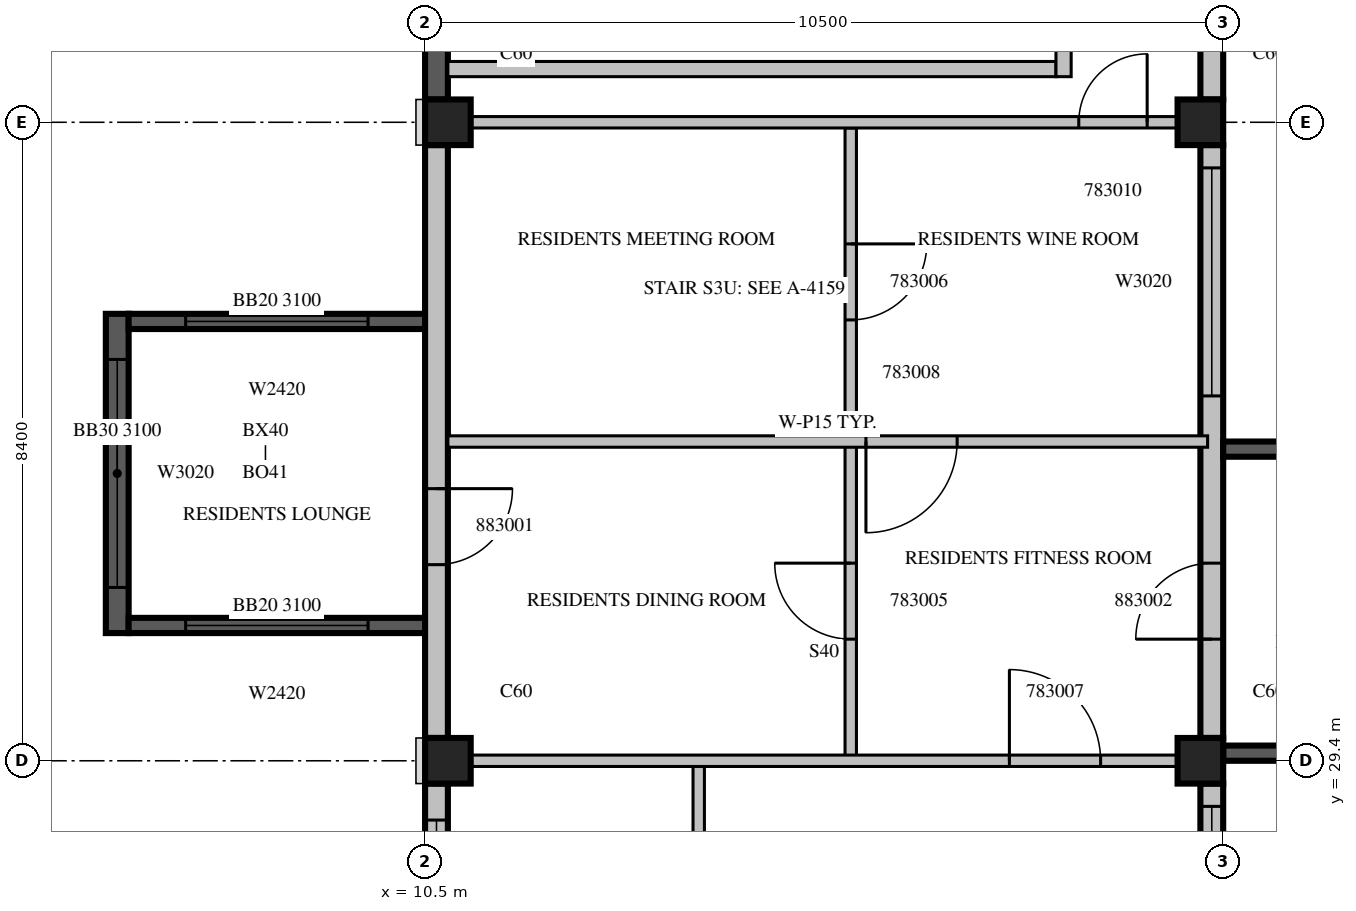
"""IFC4 building model, lengths in metres.
Left out: names, types, materials, properties, quantities, classifications, styles, units other than length and angle.
Written with IfcOpenShell. Run it as: python <this file> out.ifc"""

import sys

from ifc_helpers import new_model, si_unit, direction, frame, frame_2d, origin, origin_2d, place, context, subcontext, project, spatial, rectangle, extrude, source, transform, mapped, element, fill, save


model = new_model("IFC4")
c1 = context("Model", 3, precision=1e-05, world=origin(), true_north=direction((0.0, 1.0)))
c2 = subcontext(c1, "Body", "Model", "MODEL_VIEW")
j1 = project(units=[si_unit("LENGTHUNIT", "METRE"), si_unit("PLANEANGLEUNIT", "RADIAN")], contexts=[c1])
p1 = place(None, origin())
s1 = spatial("IfcSite", under=j1, at=p1, CompositionType="ELEMENT")
p2 = place(p1, origin())
s2 = spatial("IfcBuilding", under=s1, at=p2, CompositionType="ELEMENT")
p3 = place(p2, frame((0.0, 0.0, 351.0)))
s3 = spatial("IfcBuildingStorey", under=s2, at=p3, CompositionType="ELEMENT", Elevation=351.0)
m1 = source(origin(), c2, "Body", "SweptSolid", [
    extrude(rectangle(XDim=0.6, YDim=0.6, at=origin_2d()), origin(), (0.0, 0.0, 1.0), 3.5),
])
for number, where, z_axis, x_axis in (
    (1, (10.8, 29.4, 0.0), (0.0, 0.0, 1.0), (1.0, 0.0, 0.0)),
    (2, (20.7, 29.4, 0.0), (0.0, 0.0, 1.0), (1.0, 0.0, 0.0)),
    (3, (10.8, 37.8, 0.0), (0.0, 0.0, 1.0), (1.0, 0.0, 0.0)),
    (4, (20.7, 37.8, 0.0), (0.0, 0.0, 1.0), (1.0, 0.0, 0.0)),
):
    element("IfcColumn", number, at=place(p3, frame(where, z_axis=z_axis, x_axis=x_axis)), inside=s3, PredefinedType="COLUMN", context=c2, shape_type="MappedRepresentation", body=[
        mapped(m1, transform((0.0, 0.0, 0.0), scale=1.0)),
    ])
m2 = source(origin(), c2, "Body", "SweptSolid", [
    extrude(rectangle(XDim=4.2, YDim=0.3, at=frame_2d((2.1, 0.0))), origin(), (0.0, 0.0, 1.0), 3.1),
])
p4 = place(p3, frame((6.45, 35.28, 0.0), z_axis=(0.0, 0.0, 1.0), x_axis=(0.0, -1.0, 0.0)))
e5 = element("IfcWall", 5, at=p4, inside=s3, PredefinedType="SOLIDWALL", context=c2, shape_type="MappedRepresentation", body=[
    mapped(m2, transform((0.0, 0.0, 0.0), scale=1.0)),
])
m3 = source(origin(), c2, "Body", "SweptSolid", [
    extrude(rectangle(XDim=3.0, YDim=2.0, at=frame_2d((1.5, 1.0))), frame((0.0, 0.16, 0.0), z_axis=(0.0, -1.0, 0.0), x_axis=(1.0, 0.0, 0.0)), (0.0, 0.0, 1.0), 0.32),
])
p5 = place(p4, frame((0.6, 0.0, 0.6)))
e6 = element("IfcOpeningElement", 6, at=p5, cuts=e5, PredefinedType="OPENING", context=c2, shape_type="MappedRepresentation", body=[
    mapped(m3, transform((0.0, 0.0, 0.0), scale=1.0)),
])
m4 = source(origin(), c2, "Body", "SweptSolid", [
    extrude(rectangle(XDim=3.9, YDim=0.2, at=frame_2d((1.95, 0.0))), origin(), (0.0, 0.0, 1.0), 3.1),
])
p6 = place(p3, frame((10.5, 35.18, 0.0), z_axis=(0.0, 0.0, 1.0), x_axis=(-1.0, 0.0, 0.0)))
e7 = element("IfcWall", 7, at=p6, inside=s3, PredefinedType="SOLIDWALL", context=c2, shape_type="MappedRepresentation", body=[
    mapped(m4, transform((0.0, 0.0, 0.0), scale=1.0)),
])
m5 = source(origin(), c2, "Body", "SweptSolid", [
    extrude(rectangle(XDim=2.4, YDim=2.0, at=frame_2d((1.2, 1.0))), frame((0.0, 0.11, 0.0), z_axis=(0.0, -1.0, 0.0), x_axis=(1.0, 0.0, 0.0)), (0.0, 0.0, 1.0), 0.22),
])
p7 = place(p6, frame((0.75, 0.0, 0.6)))
e8 = element("IfcOpeningElement", 8, at=p7, cuts=e7, PredefinedType="OPENING", context=c2, shape_type="MappedRepresentation", body=[
    mapped(m5, transform((0.0, 0.0, 0.0), scale=1.0)),
])
p8 = place(p3, frame((10.5, 31.18, 0.0), z_axis=(0.0, 0.0, 1.0), x_axis=(-1.0, 0.0, 0.0)))
e9 = element("IfcWall", 9, at=p8, inside=s3, PredefinedType="SOLIDWALL", context=c2, shape_type="MappedRepresentation", body=[
    mapped(m4, transform((0.0, 0.0, 0.0), scale=1.0)),
])
p9 = place(p8, frame((0.75, 0.0, 0.6)))
e10 = element("IfcOpeningElement", 10, at=p9, cuts=e9, PredefinedType="OPENING", context=c2, shape_type="MappedRepresentation", body=[
    mapped(m5, transform((0.0, 0.0, 0.0), scale=1.0)),
])
m6 = source(origin(), c2, "Body", "SweptSolid", [
    extrude(rectangle(XDim=7.5, YDim=0.3, at=frame_2d((3.75, 0.0))), origin(), (0.0, 0.0, 1.0), 3.1),
])
p10 = place(p3, frame((20.85, 21.6, 0.0), z_axis=(0.0, 0.0, 1.0), x_axis=(0.0, 1.0, 0.0)))
e11 = element("IfcWall", 11, at=p10, inside=s3, PredefinedType="STANDARD", context=c2, shape_type="MappedRepresentation", body=[
    mapped(m6, transform((0.0, 0.0, 0.0), scale=1.0)),
])
m7 = source(origin(), c2, "Body", "SweptSolid", [
    extrude(rectangle(XDim=2.4, YDim=2.0, at=frame_2d((1.2, 1.0))), frame((0.0, 0.16, 0.0), z_axis=(0.0, -1.0, 0.0), x_axis=(1.0, 0.0, 0.0)), (0.0, 0.0, 1.0), 0.32),
])
p11 = place(p10, frame((0.3, 0.0, 0.6)))
e12 = element("IfcOpeningElement", 12, at=p11, cuts=e11, PredefinedType="OPENING", context=c2, shape_type="MappedRepresentation", body=[
    mapped(m7, transform((0.0, 0.0, 0.0), scale=1.0)),
])
p12 = place(p10, frame((4.2, 0.0, 0.6)))
e13 = element("IfcOpeningElement", 13, at=p12, cuts=e11, PredefinedType="OPENING", context=c2, shape_type="MappedRepresentation", body=[
    mapped(m3, transform((0.0, 0.0, 0.0), scale=1.0)),
])
m8 = source(origin(), c2, "Body", "SweptSolid", [
    extrude(rectangle(XDim=7.8, YDim=0.3, at=frame_2d((3.9, 0.0))), origin(), (0.0, 0.0, 1.0), 3.1),
])
p13 = place(p3, frame((20.85, 29.7, 0.0), z_axis=(0.0, 0.0, 1.0), x_axis=(0.0, 1.0, 0.0)))
e14 = element("IfcWall", 14, at=p13, inside=s3, PredefinedType="STANDARD", context=c2, shape_type="MappedRepresentation", body=[
    mapped(m8, transform((0.0, 0.0, 0.0), scale=1.0)),
])
p14 = place(p13, frame((4.5, 0.0, 0.6)))
e15 = element("IfcOpeningElement", 15, at=p14, cuts=e14, PredefinedType="OPENING", context=c2, shape_type="MappedRepresentation", body=[
    mapped(m3, transform((0.0, 0.0, 0.0), scale=1.0)),
])
m9 = source(origin(), c2, "Body", "SweptSolid", [
    extrude(rectangle(XDim=1.0, YDim=2.1, at=frame_2d((0.5, 1.05))), frame((0.0, 0.16, 0.0), z_axis=(0.0, -1.0, 0.0), x_axis=(1.0, 0.0, 0.0)), (0.0, 0.0, 1.0), 0.32),
])
p15 = place(p13, frame((1.3, 0.0, 0.0)))
e16 = element("IfcOpeningElement", 16, at=p15, cuts=e14, PredefinedType="OPENING", context=c2, shape_type="MappedRepresentation", body=[
    mapped(m9, transform((0.0, 0.0, 0.0), scale=1.0)),
])
m10 = source(origin(), c2, "Body", "SweptSolid", [
    extrude(rectangle(XDim=5.58, YDim=0.3, at=frame_2d((2.79, 0.0))), origin(), (0.0, 0.0, 1.0), 3.1),
])
p16 = place(p3, frame((20.85, 38.1, 0.0), z_axis=(0.0, 0.0, 1.0), x_axis=(0.0, 1.0, 0.0)))
e17 = element("IfcWall", 17, at=p16, inside=s3, PredefinedType="STANDARD", context=c2, shape_type="MappedRepresentation", body=[
    mapped(m10, transform((0.0, 0.0, 0.0), scale=1.0)),
])
m11 = source(origin(), c2, "Body", "SweptSolid", [
    extrude(rectangle(XDim=3.6, YDim=2.0, at=frame_2d((1.8, 1.0))), frame((0.0, 0.16, 0.0), z_axis=(0.0, -1.0, 0.0), x_axis=(1.0, 0.0, 0.0)), (0.0, 0.0, 1.0), 0.32),
])
p17 = place(p16, frame((0.84, 0.0, 0.6)))
e18 = element("IfcOpeningElement", 18, at=p17, cuts=e17, PredefinedType="OPENING", context=c2, shape_type="MappedRepresentation", body=[
    mapped(m11, transform((0.0, 0.0, 0.0), scale=1.0)),
])
m12 = source(origin(), c2, "Body", "SweptSolid", [
    extrude(rectangle(XDim=5.58, YDim=0.3, at=frame_2d((2.79, 0.0))), origin(), (0.0, 0.0, 1.0), 3.1),
])
p18 = place(p3, frame((10.65, 43.68, 0.0), z_axis=(0.0, 0.0, 1.0), x_axis=(0.0, -1.0, 0.0)))
e19 = element("IfcWall", 19, at=p18, inside=s3, PredefinedType="SOLIDWALL", context=c2, shape_type="MappedRepresentation", body=[
    mapped(m12, transform((0.0, 0.0, 0.0), scale=1.0)),
])
p19 = place(p3, frame((10.65, 37.5, 0.0), z_axis=(0.0, 0.0, 1.0), x_axis=(0.0, -1.0, 0.0)))
e20 = element("IfcWall", 20, at=p19, inside=s3, PredefinedType="STANDARD", context=c2, shape_type="MappedRepresentation", body=[
    mapped(m8, transform((0.0, 0.0, 0.0), scale=1.0)),
])
p20 = place(p19, frame((4.52, 0.0, 0.0)))
e21 = element("IfcOpeningElement", 21, at=p20, cuts=e20, PredefinedType="OPENING", context=c2, shape_type="MappedRepresentation", body=[
    mapped(m9, transform((0.0, 0.0, 0.0), scale=1.0)),
])
p21 = place(p3, frame((10.65, 29.1, 0.0), z_axis=(0.0, 0.0, 1.0), x_axis=(0.0, -1.0, 0.0)))
e22 = element("IfcWall", 22, at=p21, inside=s3, PredefinedType="STANDARD", context=c2, shape_type="MappedRepresentation", body=[
    mapped(m6, transform((0.0, 0.0, 0.0), scale=1.0)),
])
p22 = place(p21, frame((3.36, 0.0, 0.6)))
e23 = element("IfcOpeningElement", 23, at=p22, cuts=e22, PredefinedType="OPENING", context=c2, shape_type="MappedRepresentation", body=[
    mapped(m11, transform((0.0, 0.0, 0.0), scale=1.0)),
])
p23 = place(p21, frame((0.48, 0.0, 0.6)))
e24 = element("IfcOpeningElement", 24, at=p23, cuts=e22, PredefinedType="OPENING", context=c2, shape_type="MappedRepresentation", body=[
    mapped(m7, transform((0.0, 0.0, 0.0), scale=1.0)),
])
m13 = source(origin(), c2, "Body", "SweptSolid", [
    extrude(rectangle(XDim=3.9, YDim=0.2, at=frame_2d((1.95, 0.0))), origin(), (0.0, 0.0, 1.0), 3.09),
])
p24 = place(p3, frame((21.0, 29.5, 0.0), z_axis=(0.0, 0.0, 1.0), x_axis=(1.0, 0.0, 0.0)))
e25 = element("IfcWall", 25, at=p24, inside=s3, PredefinedType="SOLIDWALL", context=c2, shape_type="MappedRepresentation", body=[
    mapped(m13, transform((0.0, 0.0, 0.0), scale=1.0)),
])
p25 = place(p24, frame((0.75, 0.0, 0.6)))
e26 = element("IfcOpeningElement", 26, at=p25, cuts=e25, PredefinedType="OPENING", context=c2, shape_type="MappedRepresentation", body=[
    mapped(m5, transform((0.0, 0.0, 0.0), scale=1.0)),
])
p26 = place(p3, frame((21.0, 33.5, 0.0), z_axis=(0.0, 0.0, 1.0), x_axis=(1.0, 0.0, 0.0)))
e27 = element("IfcWall", 27, at=p26, inside=s3, PredefinedType="SOLIDWALL", context=c2, shape_type="MappedRepresentation", body=[
    mapped(m13, transform((0.0, 0.0, 0.0), scale=1.0)),
])
p27 = place(p26, frame((0.75, 0.0, 0.6)))
e28 = element("IfcOpeningElement", 28, at=p27, cuts=e27, PredefinedType="OPENING", context=c2, shape_type="MappedRepresentation", body=[
    mapped(m5, transform((0.0, 0.0, 0.0), scale=1.0)),
])
m14 = source(origin(), c2, "Body", "SweptSolid", [
    extrude(rectangle(XDim=8.0, YDim=0.2, at=frame_2d((4.0, 0.0))), origin(), (0.0, 0.0, 1.0), 3.1),
])
p28 = place(p3, frame((10.8, 38.5, 0.0), z_axis=(0.0, 0.0, 1.0), x_axis=(1.0, 0.0, 0.0)))
e29 = element("IfcWall", 29, at=p28, inside=s3, PredefinedType="PARTITIONING", context=c2, shape_type="MappedRepresentation", body=[
    mapped(m14, transform((0.0, 0.0, 0.0), scale=1.0)),
])
m15 = source(origin(), c2, "Body", "SweptSolid", [
    extrude(rectangle(XDim=5.45, YDim=0.2, at=frame_2d((2.725, 0.0))), origin(), (0.0, 0.0, 1.0), 3.1),
])
p29 = place(p3, frame((18.9, 38.4, 0.0), z_axis=(0.0, 0.0, 1.0), x_axis=(0.0, 1.0, 0.0)))
e30 = element("IfcWall", 30, at=p29, inside=s3, PredefinedType="PARTITIONING", context=c2, shape_type="MappedRepresentation", body=[
    mapped(m15, transform((0.0, 0.0, 0.0), scale=1.0)),
])
m16 = source(origin(), c2, "Body", "SweptSolid", [
    extrude(rectangle(XDim=1.2, YDim=2.1, at=frame_2d((0.6, 1.05))), frame((0.0, 0.11, 0.0), z_axis=(0.0, -1.0, 0.0), x_axis=(1.0, 0.0, 0.0)), (0.0, 0.0, 1.0), 0.22),
])
p30 = place(p29, frame((0.4, 0.0, 0.0)))
e31 = element("IfcOpeningElement", 31, at=p30, cuts=e30, PredefinedType="OPENING", context=c2, shape_type="MappedRepresentation", body=[
    mapped(m16, transform((0.0, 0.0, 0.0), scale=1.0)),
])
m17 = source(origin(), c2, "Body", "SweptSolid", [
    extrude(rectangle(XDim=0.9, YDim=2.1, at=frame_2d((0.45, 1.05))), frame((0.0, 0.11, 0.0), z_axis=(0.0, -1.0, 0.0), x_axis=(1.0, 0.0, 0.0)), (0.0, 0.0, 1.0), 0.22),
])
p31 = place(p29, frame((3.25, 0.0, 0.0)))
e32 = element("IfcOpeningElement", 32, at=p31, cuts=e30, PredefinedType="OPENING", context=c2, shape_type="MappedRepresentation", body=[
    mapped(m17, transform((0.0, 0.0, 0.0), scale=1.0)),
])
m18 = source(origin(), c2, "Body", "SweptSolid", [
    extrude(rectangle(XDim=7.725, YDim=0.15, at=frame_2d((3.862, 0.0))), origin(), (0.0, 0.0, 1.0), 3.1),
])
p32 = place(p3, frame((14.1, 29.325, 0.0), z_axis=(0.0, 0.0, 1.0), x_axis=(0.0, -1.0, 0.0)))
e33 = element("IfcWall", 33, at=p32, inside=s3, PredefinedType="PARTITIONING", context=c2, shape_type="MappedRepresentation", body=[
    mapped(m18, transform((0.0, 0.0, 0.0), scale=1.0)),
])
m19 = source(origin(), c2, "Body", "SweptSolid", [
    extrude(rectangle(XDim=2.2, YDim=2.1, at=frame_2d((1.1, 1.05))), frame((0.0, 0.085, 0.0), z_axis=(0.0, -1.0, 0.0), x_axis=(1.0, 0.0, 0.0)), (0.0, 0.0, 1.0), 0.17),
])
p33 = place(p32, frame((4.925, 0.0, 0.0)))
e34 = element("IfcOpeningElement", 34, at=p33, cuts=e33, PredefinedType="OPENING", context=c2, shape_type="MappedRepresentation", body=[
    mapped(m19, transform((0.0, 0.0, 0.0), scale=1.0)),
])
m20 = source(origin(), c2, "Body", "SweptSolid", [
    extrude(rectangle(XDim=4.2, YDim=0.15, at=frame_2d((2.1, 0.0))), origin(), (0.0, 0.0, 1.0), 3.1),
])
p34 = place(p3, frame((16.1, 33.6, 0.0), z_axis=(0.0, 0.0, 1.0), x_axis=(0.0, -1.0, 0.0)))
e35 = element("IfcWall", 35, at=p34, inside=s3, PredefinedType="PARTITIONING", context=c2, shape_type="MappedRepresentation", body=[
    mapped(m20, transform((0.0, 0.0, 0.0), scale=1.0)),
])
m21 = source(origin(), c2, "Body", "SweptSolid", [
    extrude(rectangle(XDim=1.0, YDim=2.1, at=frame_2d((0.5, 1.05))), frame((0.0, 0.085, 0.0), z_axis=(0.0, -1.0, 0.0), x_axis=(1.0, 0.0, 0.0)), (0.0, 0.0, 1.0), 0.17),
])
p35 = place(p34, frame((1.6, 0.0, 0.0)))
e36 = element("IfcOpeningElement", 36, at=p35, cuts=e35, PredefinedType="OPENING", context=c2, shape_type="MappedRepresentation", body=[
    mapped(m21, transform((0.0, 0.0, 0.0), scale=1.0)),
])
m22 = source(origin(), c2, "Body", "SweptSolid", [
    extrude(rectangle(XDim=4.105, YDim=0.15, at=frame_2d((2.053, 0.0))), origin(), (0.0, 0.0, 1.0), 3.1),
])
p36 = place(p3, frame((16.1, 37.725, 0.0), z_axis=(0.0, 0.0, 1.0), x_axis=(0.0, -1.0, 0.0)))
e37 = element("IfcWall", 37, at=p36, inside=s3, PredefinedType="PARTITIONING", context=c2, shape_type="MappedRepresentation", body=[
    mapped(m22, transform((0.0, 0.0, 0.0), scale=1.0)),
])
p37 = place(p36, frame((1.525, 0.0, 0.0)))
e38 = element("IfcOpeningElement", 38, at=p37, cuts=e37, PredefinedType="OPENING", context=c2, shape_type="MappedRepresentation", body=[
    mapped(m21, transform((0.0, 0.0, 0.0), scale=1.0)),
])
m23 = source(origin(), c2, "Body", "SweptSolid", [
    extrude(rectangle(XDim=9.302, YDim=0.15, at=frame_2d((4.651, 0.0))), origin(), (0.0, 0.0, 1.0), 3.1),
])
p38 = place(p3, frame((11.099, 29.4, 0.0), z_axis=(0.0, 0.0, 1.0), x_axis=(1.0, 0.0, 0.0)))
e39 = element("IfcWall", 39, at=p38, inside=s3, PredefinedType="PARTITIONING", context=c2, shape_type="MappedRepresentation", body=[
    mapped(m23, transform((0.0, 0.0, 0.0), scale=1.0)),
])
m24 = source(origin(), c2, "Body", "SweptSolid", [
    extrude(rectangle(XDim=1.2, YDim=2.1, at=frame_2d((0.6, 1.05))), frame((0.0, 0.085, 0.0), z_axis=(0.0, -1.0, 0.0), x_axis=(1.0, 0.0, 0.0)), (0.0, 0.0, 1.0), 0.17),
])
p39 = place(p38, frame((7.088, 0.0, 0.0)))
e40 = element("IfcOpeningElement", 40, at=p39, cuts=e39, PredefinedType="OPENING", context=c2, shape_type="MappedRepresentation", body=[
    mapped(m24, transform((0.0, 0.0, 0.0), scale=1.0)),
])
m25 = source(origin(), c2, "Body", "SweptSolid", [
    extrude(rectangle(XDim=9.995, YDim=0.15, at=frame_2d((4.997, 0.0))), origin(), (0.0, 0.0, 1.0), 3.1),
])
p40 = place(p3, frame((10.8, 33.6, 0.0), z_axis=(0.0, 0.0, 1.0), x_axis=(1.0, 0.0, 0.0)))
e41 = element("IfcWall", 41, at=p40, inside=s3, PredefinedType="PARTITIONING", context=c2, shape_type="MappedRepresentation", body=[
    mapped(m25, transform((0.0, 0.0, 0.0), scale=1.0)),
])
p41 = place(p40, frame((5.5, 0.0, 0.0)))
e42 = element("IfcOpeningElement", 42, at=p41, cuts=e41, PredefinedType="OPENING", context=c2, shape_type="MappedRepresentation", body=[
    mapped(m24, transform((0.0, 0.0, 0.0), scale=1.0)),
])
p42 = place(p3, frame((20.401, 37.8, 0.0), z_axis=(0.0, 0.0, 1.0), x_axis=(-1.0, 0.0, 0.0)))
e43 = element("IfcWall", 43, at=p42, inside=s3, PredefinedType="PARTITIONING", context=c2, shape_type="MappedRepresentation", body=[
    mapped(m23, transform((0.0, 0.0, 0.0), scale=1.0)),
])
m26 = source(origin(), c2, "Body", "SweptSolid", [
    extrude(rectangle(XDim=0.9, YDim=2.1, at=frame_2d((0.45, 1.05))), frame((0.0, 0.085, 0.0), z_axis=(0.0, -1.0, 0.0), x_axis=(1.0, 0.0, 0.0)), (0.0, 0.0, 1.0), 0.17),
])
p43 = place(p42, frame((0.401, 0.0, 0.0)))
e44 = element("IfcOpeningElement", 44, at=p43, cuts=e43, PredefinedType="OPENING", context=c2, shape_type="MappedRepresentation", body=[
    mapped(m26, transform((0.0, 0.0, 0.0), scale=1.0)),
])
m27 = source(origin(), c2, "Body", "SweptSolid", [
    extrude(rectangle(XDim=3.0, YDim=2.0, at=frame_2d((1.5, 1.0))), frame((0.0, 0.03, 0.0), z_axis=(0.0, -1.0, 0.0), x_axis=(1.0, 0.0, 0.0)), (0.0, 0.0, 1.0), 0.06),
])
p44 = place(p5, origin())
e45 = element("IfcWindow", 45, at=p44, inside=s3, PartitioningType="SINGLE_PANEL", PredefinedType="WINDOW", context=c2, shape_type="MappedRepresentation", body=[
    mapped(m27, transform((0.0, 0.0, 0.0), scale=1.0)),
])
fill(e6, e45)
m28 = source(origin(), c2, "Body", "SweptSolid", [
    extrude(rectangle(XDim=2.4, YDim=2.0, at=frame_2d((1.2, 1.0))), frame((0.0, 0.03, 0.0), z_axis=(0.0, -1.0, 0.0), x_axis=(1.0, 0.0, 0.0)), (0.0, 0.0, 1.0), 0.06),
])
p45 = place(p7, origin())
e46 = element("IfcWindow", 46, at=p45, inside=s3, PartitioningType="SINGLE_PANEL", PredefinedType="WINDOW", context=c2, shape_type="MappedRepresentation", body=[
    mapped(m28, transform((0.0, 0.0, 0.0), scale=1.0)),
])
fill(e8, e46)
p46 = place(p9, origin())
e47 = element("IfcWindow", 47, at=p46, inside=s3, PartitioningType="SINGLE_PANEL", PredefinedType="WINDOW", context=c2, shape_type="MappedRepresentation", body=[
    mapped(m28, transform((0.0, 0.0, 0.0), scale=1.0)),
])
fill(e10, e47)
p47 = place(p12, origin())
e48 = element("IfcWindow", 48, at=p47, inside=s3, PartitioningType="SINGLE_PANEL", PredefinedType="WINDOW", context=c2, shape_type="MappedRepresentation", body=[
    mapped(m27, transform((0.0, 0.0, 0.0), scale=1.0)),
])
fill(e13, e48)
p48 = place(p14, origin())
e49 = element("IfcWindow", 49, at=p48, inside=s3, PartitioningType="SINGLE_PANEL", PredefinedType="WINDOW", context=c2, shape_type="MappedRepresentation", body=[
    mapped(m27, transform((0.0, 0.0, 0.0), scale=1.0)),
])
fill(e15, e49)
p49 = place(p23, origin())
e50 = element("IfcWindow", 50, at=p49, inside=s3, PartitioningType="SINGLE_PANEL", PredefinedType="WINDOW", context=c2, shape_type="MappedRepresentation", body=[
    mapped(m28, transform((0.0, 0.0, 0.0), scale=1.0)),
])
fill(e24, e50)
m29 = source(origin(), c2, "Body", "SweptSolid", [
    extrude(rectangle(XDim=1.0, YDim=2.1, at=frame_2d((0.5, 1.05))), frame((0.0, 0.025, 0.0), z_axis=(0.0, -1.0, 0.0), x_axis=(1.0, 0.0, 0.0)), (0.0, 0.0, 1.0), 0.05),
])
p50 = place(p35, origin())
e51 = element("IfcDoor", 51, at=p50, inside=s3, OperationType="SINGLE_SWING_RIGHT", PredefinedType="DOOR", context=c2, shape_type="MappedRepresentation", body=[
    mapped(m29, transform((0.0, 0.0, 0.0), scale=1.0)),
])
fill(e36, e51)
p51 = place(p37, origin())
e52 = element("IfcDoor", 52, at=p51, inside=s3, OperationType="SINGLE_SWING_LEFT", PredefinedType="DOOR", context=c2, shape_type="MappedRepresentation", body=[
    mapped(m29, transform((0.0, 0.0, 0.0), scale=1.0)),
])
fill(e38, e52)
m30 = source(origin(), c2, "Body", "SweptSolid", [
    extrude(rectangle(XDim=1.2, YDim=2.1, at=frame_2d((0.6, 1.05))), frame((0.0, 0.025, 0.0), z_axis=(0.0, -1.0, 0.0), x_axis=(1.0, 0.0, 0.0)), (0.0, 0.0, 1.0), 0.05),
])
p52 = place(p39, origin())
e53 = element("IfcDoor", 53, at=p52, inside=s3, OperationType="SINGLE_SWING_LEFT", PredefinedType="DOOR", context=c2, shape_type="MappedRepresentation", body=[
    mapped(m30, transform((0.0, 0.0, 0.0), scale=1.0)),
])
fill(e40, e53)
p53 = place(p41, origin())
e54 = element("IfcDoor", 54, at=p53, inside=s3, OperationType="SINGLE_SWING_RIGHT", PredefinedType="DOOR", context=c2, shape_type="MappedRepresentation", body=[
    mapped(m30, transform((0.0, 0.0, 0.0), scale=1.0)),
])
fill(e42, e54)
m31 = source(origin(), c2, "Body", "SweptSolid", [
    extrude(rectangle(XDim=0.9, YDim=2.1, at=frame_2d((0.45, 1.05))), frame((0.0, 0.025, 0.0), z_axis=(0.0, -1.0, 0.0), x_axis=(1.0, 0.0, 0.0)), (0.0, 0.0, 1.0), 0.05),
])
p54 = place(p43, origin())
e55 = element("IfcDoor", 55, at=p54, inside=s3, OperationType="SINGLE_SWING_RIGHT", PredefinedType="DOOR", context=c2, shape_type="MappedRepresentation", body=[
    mapped(m31, transform((0.0, 0.0, 0.0), scale=1.0)),
])
fill(e44, e55)
p55 = place(p20, origin())
e56 = element("IfcDoor", 56, at=p55, inside=s3, OperationType="SINGLE_SWING_LEFT", PredefinedType="DOOR", context=c2, shape_type="MappedRepresentation", body=[
    mapped(m29, transform((0.0, 0.0, 0.0), scale=1.0)),
])
fill(e21, e56)
p56 = place(p15, origin())
e57 = element("IfcDoor", 57, at=p56, inside=s3, OperationType="SINGLE_SWING_LEFT", PredefinedType="DOOR", context=c2, shape_type="MappedRepresentation", body=[
    mapped(m29, transform((0.0, 0.0, 0.0), scale=1.0)),
])
fill(e16, e57)
save(model, sys.argv[1])
